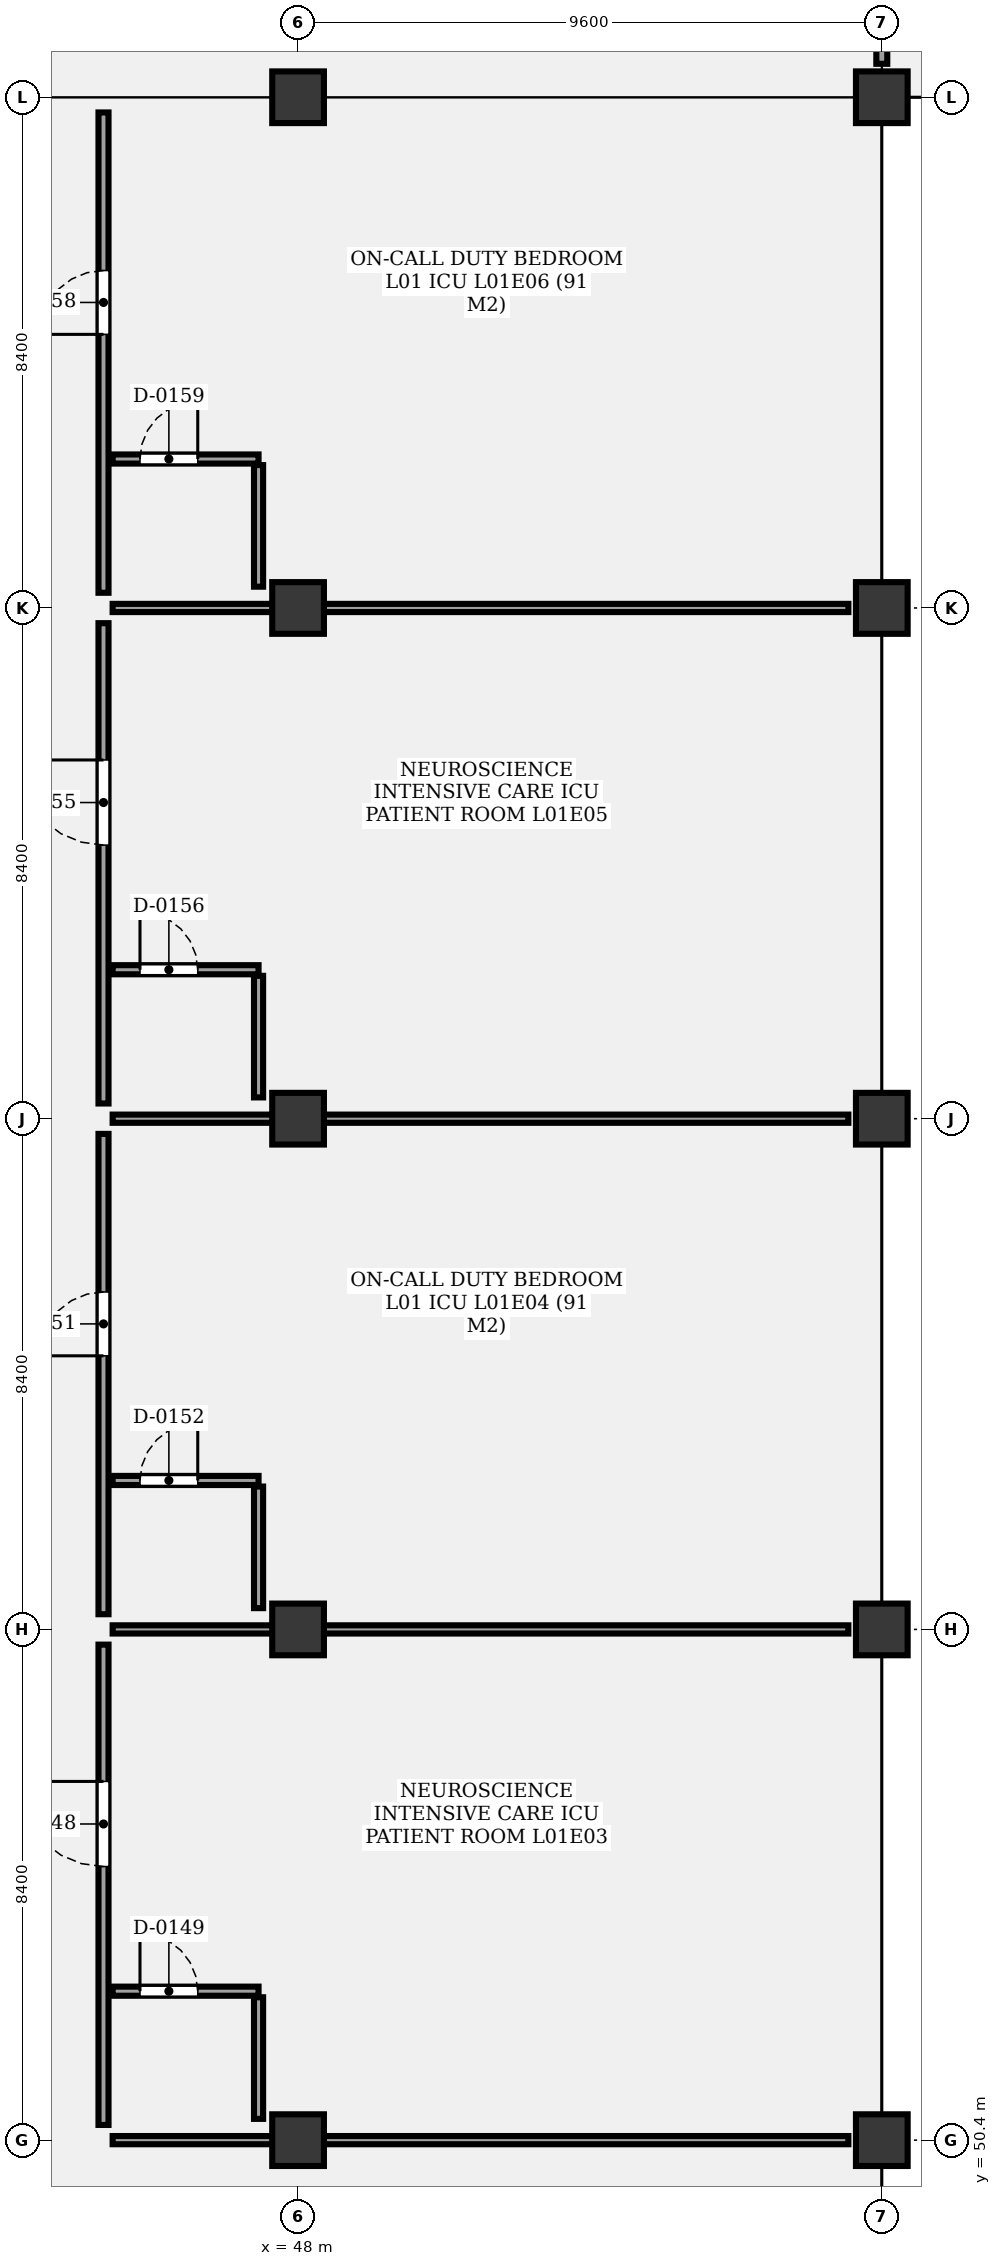
"""IFC4 building model, lengths in metres.
Left out: names, types, materials, properties, quantities, classifications, styles, units other than length and angle.
Written with IfcOpenShell. Run it as: python <this file> out.ifc"""

import sys

from ifc_helpers import new_model, si_unit, direction, frame, frame_2d, origin, origin_2d, place, context, subcontext, project, spatial, rectangle, extrude, element, fill, save


model = new_model("IFC4")
c1 = context("Model", 3, precision=1e-05, world=origin(), true_north=direction((0.0, 1.0)))
c2 = subcontext(c1, "Body", "Model", "MODEL_VIEW")
j1 = project(units=[si_unit("LENGTHUNIT", "METRE"), si_unit("PLANEANGLEUNIT", "RADIAN")], contexts=[c1])
p1 = place(None, origin())
s1 = spatial("IfcSite", under=j1, at=p1, CompositionType="ELEMENT")
p2 = place(p1, origin())
s2 = spatial("IfcBuilding", under=s1, at=p2, CompositionType="ELEMENT")
p3 = place(p2, frame((0.0, 0.0, 5.1)))
s3 = spatial("IfcBuildingStorey", under=s2, at=p3, CompositionType="ELEMENT", Elevation=5.1)
for number, where, z_axis, x_axis in (
    (1, (48.0, 50.4, 0.0), (0.0, 0.0, 1.0), (1.0, 0.0, 0.0)),
    (2, (48.0, 58.8, 0.0), (0.0, 0.0, 1.0), (1.0, 0.0, 0.0)),
    (3, (48.0, 67.2, 0.0), (0.0, 0.0, 1.0), (1.0, 0.0, 0.0)),
    (4, (48.0, 75.6, 0.0), (0.0, 0.0, 1.0), (1.0, 0.0, 0.0)),
    (5, (48.0, 84.0, 0.0), (0.0, 0.0, 1.0), (1.0, 0.0, 0.0)),
    (6, (57.6, 50.4, 0.0), (0.0, 0.0, 1.0), (1.0, 0.0, 0.0)),
    (7, (57.6, 58.8, 0.0), (0.0, 0.0, 1.0), (1.0, 0.0, 0.0)),
    (8, (57.6, 67.2, 0.0), (0.0, 0.0, 1.0), (1.0, 0.0, 0.0)),
    (9, (57.6, 75.6, 0.0), (0.0, 0.0, 1.0), (1.0, 0.0, 0.0)),
    (10, (57.6, 84.0, 0.0), (0.0, 0.0, 1.0), (1.0, 0.0, 0.0)),
):
    element("IfcColumn", number, at=place(p3, frame(where, z_axis=z_axis, x_axis=x_axis)), inside=s3, PredefinedType="COLUMN", context=c2, shape_type="SweptSolid", body=[
        extrude(rectangle(XDim=0.85, YDim=0.85, at=origin_2d()), origin(), (0.0, 0.0, 1.0), 4.8),
    ])
p4 = place(p3, frame((57.6, 84.55, 0.0), z_axis=(0.0, 0.0, 1.0), x_axis=(0.0, 1.0, 0.0)))
e11 = element("IfcWall", 11, at=p4, inside=s3, PredefinedType="PARTITIONING", context=c2, shape_type="SweptSolid", body=[
    extrude(rectangle(XDim=17.3, YDim=0.18, at=frame_2d((8.65, 0.0))), origin(), (0.0, 0.0, 1.0), 3.68),
])
p5 = place(p3, frame((44.8, 50.65, 0.0), z_axis=(0.0, 0.0, 1.0), x_axis=(0.0, 1.0, 0.0)))
e12 = element("IfcWall", 12, at=p5, inside=s3, PredefinedType="PARTITIONING", context=c2, shape_type="SweptSolid", body=[
    extrude(rectangle(XDim=7.9, YDim=0.165, at=frame_2d((3.95, 0.0))), origin(), (0.0, 0.0, 1.0), 3.68),
])
p6 = place(p5, frame((4.25, 0.0, 0.0)))
e13 = element("IfcOpeningElement", 13, at=p6, cuts=e12, PredefinedType="OPENING", context=c2, shape_type="SweptSolid", body=[
    extrude(rectangle(XDim=1.4, YDim=2.4, at=frame_2d((0.7, 1.2))), frame((0.0, 0.093, 0.0), z_axis=(0.0, -1.0, 0.0), x_axis=(1.0, 0.0, 0.0)), (0.0, 0.0, 1.0), 0.185),
])
p7 = place(p3, frame((44.95, 52.85, 0.0), z_axis=(0.0, 0.0, 1.0), x_axis=(1.0, 0.0, 0.0)))
e14 = element("IfcWall", 14, at=p7, inside=s3, PredefinedType="PARTITIONING", context=c2, shape_type="SweptSolid", body=[
    extrude(rectangle(XDim=2.4, YDim=0.15, at=frame_2d((1.2, 0.0))), origin(), (0.0, 0.0, 1.0), 3.68),
])
p8 = place(p7, frame((0.45, 0.0, 0.0)))
e15 = element("IfcOpeningElement", 15, at=p8, cuts=e14, PredefinedType="OPENING", context=c2, shape_type="SweptSolid", body=[
    extrude(rectangle(XDim=0.95, YDim=2.1, at=frame_2d((0.475, 1.05))), frame((0.0, 0.085, 0.0), z_axis=(0.0, -1.0, 0.0), x_axis=(1.0, 0.0, 0.0)), (0.0, 0.0, 1.0), 0.17),
])
p9 = place(p3, frame((47.35, 50.75, 0.0), z_axis=(0.0, 0.0, 1.0), x_axis=(0.0, 1.0, 0.0)))
e16 = element("IfcWall", 16, at=p9, inside=s3, PredefinedType="PARTITIONING", context=c2, shape_type="SweptSolid", body=[
    extrude(rectangle(XDim=2.0, YDim=0.15, at=frame_2d((1.0, 0.0))), origin(), (0.0, 0.0, 1.0), 3.68),
])
p10 = place(p3, frame((44.95, 50.4, 0.0), z_axis=(0.0, 0.0, 1.0), x_axis=(1.0, 0.0, 0.0)))
e17 = element("IfcWall", 17, at=p10, inside=s3, PredefinedType="PARTITIONING", context=c2, shape_type="SweptSolid", body=[
    extrude(rectangle(XDim=12.1, YDim=0.135, at=frame_2d((6.05, 0.0))), origin(), (0.0, 0.0, 1.0), 3.68),
])
p11 = place(p3, frame((44.8, 59.05, 0.0), z_axis=(0.0, 0.0, 1.0), x_axis=(0.0, 1.0, 0.0)))
e18 = element("IfcWall", 18, at=p11, inside=s3, PredefinedType="PARTITIONING", context=c2, shape_type="SweptSolid", body=[
    extrude(rectangle(XDim=7.9, YDim=0.165, at=frame_2d((3.95, 0.0))), origin(), (0.0, 0.0, 1.0), 3.68),
])
p12 = place(p11, frame((4.25, 0.0, 0.0)))
e19 = element("IfcOpeningElement", 19, at=p12, cuts=e18, PredefinedType="OPENING", context=c2, shape_type="SweptSolid", body=[
    extrude(rectangle(XDim=1.05, YDim=2.2, at=frame_2d((0.525, 1.1))), frame((0.0, 0.093, 0.0), z_axis=(0.0, -1.0, 0.0), x_axis=(1.0, 0.0, 0.0)), (0.0, 0.0, 1.0), 0.185),
])
p13 = place(p3, frame((44.95, 61.25, 0.0), z_axis=(0.0, 0.0, 1.0), x_axis=(1.0, 0.0, 0.0)))
e20 = element("IfcWall", 20, at=p13, inside=s3, PredefinedType="PARTITIONING", context=c2, shape_type="SweptSolid", body=[
    extrude(rectangle(XDim=2.4, YDim=0.15, at=frame_2d((1.2, 0.0))), origin(), (0.0, 0.0, 1.0), 3.68),
])
p14 = place(p13, frame((0.45, 0.0, 0.0)))
e21 = element("IfcOpeningElement", 21, at=p14, cuts=e20, PredefinedType="OPENING", context=c2, shape_type="SweptSolid", body=[
    extrude(rectangle(XDim=0.95, YDim=2.1, at=frame_2d((0.475, 1.05))), frame((0.0, 0.085, 0.0), z_axis=(0.0, -1.0, 0.0), x_axis=(1.0, 0.0, 0.0)), (0.0, 0.0, 1.0), 0.17),
])
p15 = place(p3, frame((47.35, 59.15, 0.0), z_axis=(0.0, 0.0, 1.0), x_axis=(0.0, 1.0, 0.0)))
e22 = element("IfcWall", 22, at=p15, inside=s3, PredefinedType="PARTITIONING", context=c2, shape_type="SweptSolid", body=[
    extrude(rectangle(XDim=2.0, YDim=0.15, at=frame_2d((1.0, 0.0))), origin(), (0.0, 0.0, 1.0), 3.68),
])
p16 = place(p3, frame((44.95, 58.8, 0.0), z_axis=(0.0, 0.0, 1.0), x_axis=(1.0, 0.0, 0.0)))
e23 = element("IfcWall", 23, at=p16, inside=s3, PredefinedType="PARTITIONING", context=c2, shape_type="SweptSolid", body=[
    extrude(rectangle(XDim=12.1, YDim=0.135, at=frame_2d((6.05, 0.0))), origin(), (0.0, 0.0, 1.0), 3.68),
])
p17 = place(p3, frame((44.8, 67.45, 0.0), z_axis=(0.0, 0.0, 1.0), x_axis=(0.0, 1.0, 0.0)))
e24 = element("IfcWall", 24, at=p17, inside=s3, PredefinedType="PARTITIONING", context=c2, shape_type="SweptSolid", body=[
    extrude(rectangle(XDim=7.9, YDim=0.165, at=frame_2d((3.95, 0.0))), origin(), (0.0, 0.0, 1.0), 3.68),
])
p18 = place(p17, frame((4.25, 0.0, 0.0)))
e25 = element("IfcOpeningElement", 25, at=p18, cuts=e24, PredefinedType="OPENING", context=c2, shape_type="SweptSolid", body=[
    extrude(rectangle(XDim=1.4, YDim=2.4, at=frame_2d((0.7, 1.2))), frame((0.0, 0.093, 0.0), z_axis=(0.0, -1.0, 0.0), x_axis=(1.0, 0.0, 0.0)), (0.0, 0.0, 1.0), 0.185),
])
p19 = place(p3, frame((44.95, 69.65, 0.0), z_axis=(0.0, 0.0, 1.0), x_axis=(1.0, 0.0, 0.0)))
e26 = element("IfcWall", 26, at=p19, inside=s3, PredefinedType="PARTITIONING", context=c2, shape_type="SweptSolid", body=[
    extrude(rectangle(XDim=2.4, YDim=0.15, at=frame_2d((1.2, 0.0))), origin(), (0.0, 0.0, 1.0), 3.68),
])
p20 = place(p19, frame((0.45, 0.0, 0.0)))
e27 = element("IfcOpeningElement", 27, at=p20, cuts=e26, PredefinedType="OPENING", context=c2, shape_type="SweptSolid", body=[
    extrude(rectangle(XDim=0.95, YDim=2.1, at=frame_2d((0.475, 1.05))), frame((0.0, 0.085, 0.0), z_axis=(0.0, -1.0, 0.0), x_axis=(1.0, 0.0, 0.0)), (0.0, 0.0, 1.0), 0.17),
])
p21 = place(p3, frame((47.35, 67.55, 0.0), z_axis=(0.0, 0.0, 1.0), x_axis=(0.0, 1.0, 0.0)))
e28 = element("IfcWall", 28, at=p21, inside=s3, PredefinedType="PARTITIONING", context=c2, shape_type="SweptSolid", body=[
    extrude(rectangle(XDim=2.0, YDim=0.15, at=frame_2d((1.0, 0.0))), origin(), (0.0, 0.0, 1.0), 3.68),
])
p22 = place(p3, frame((44.95, 67.2, 0.0), z_axis=(0.0, 0.0, 1.0), x_axis=(1.0, 0.0, 0.0)))
e29 = element("IfcWall", 29, at=p22, inside=s3, PredefinedType="PARTITIONING", context=c2, shape_type="SweptSolid", body=[
    extrude(rectangle(XDim=12.1, YDim=0.135, at=frame_2d((6.05, 0.0))), origin(), (0.0, 0.0, 1.0), 3.68),
])
p23 = place(p3, frame((44.8, 75.85, 0.0), z_axis=(0.0, 0.0, 1.0), x_axis=(0.0, 1.0, 0.0)))
e30 = element("IfcWall", 30, at=p23, inside=s3, PredefinedType="PARTITIONING", context=c2, shape_type="SweptSolid", body=[
    extrude(rectangle(XDim=7.9, YDim=0.165, at=frame_2d((3.95, 0.0))), origin(), (0.0, 0.0, 1.0), 3.68),
])
p24 = place(p23, frame((4.25, 0.0, 0.0)))
e31 = element("IfcOpeningElement", 31, at=p24, cuts=e30, PredefinedType="OPENING", context=c2, shape_type="SweptSolid", body=[
    extrude(rectangle(XDim=1.05, YDim=2.2, at=frame_2d((0.525, 1.1))), frame((0.0, 0.093, 0.0), z_axis=(0.0, -1.0, 0.0), x_axis=(1.0, 0.0, 0.0)), (0.0, 0.0, 1.0), 0.185),
])
p25 = place(p3, frame((44.95, 78.05, 0.0), z_axis=(0.0, 0.0, 1.0), x_axis=(1.0, 0.0, 0.0)))
e32 = element("IfcWall", 32, at=p25, inside=s3, PredefinedType="PARTITIONING", context=c2, shape_type="SweptSolid", body=[
    extrude(rectangle(XDim=2.4, YDim=0.15, at=frame_2d((1.2, 0.0))), origin(), (0.0, 0.0, 1.0), 3.68),
])
p26 = place(p25, frame((0.45, 0.0, 0.0)))
e33 = element("IfcOpeningElement", 33, at=p26, cuts=e32, PredefinedType="OPENING", context=c2, shape_type="SweptSolid", body=[
    extrude(rectangle(XDim=0.95, YDim=2.1, at=frame_2d((0.475, 1.05))), frame((0.0, 0.085, 0.0), z_axis=(0.0, -1.0, 0.0), x_axis=(1.0, 0.0, 0.0)), (0.0, 0.0, 1.0), 0.17),
])
p27 = place(p3, frame((47.35, 75.95, 0.0), z_axis=(0.0, 0.0, 1.0), x_axis=(0.0, 1.0, 0.0)))
e34 = element("IfcWall", 34, at=p27, inside=s3, PredefinedType="PARTITIONING", context=c2, shape_type="SweptSolid", body=[
    extrude(rectangle(XDim=2.0, YDim=0.15, at=frame_2d((1.0, 0.0))), origin(), (0.0, 0.0, 1.0), 3.68),
])
p28 = place(p3, frame((44.95, 75.6, 0.0), z_axis=(0.0, 0.0, 1.0), x_axis=(1.0, 0.0, 0.0)))
e35 = element("IfcWall", 35, at=p28, inside=s3, PredefinedType="PARTITIONING", context=c2, shape_type="SweptSolid", body=[
    extrude(rectangle(XDim=12.1, YDim=0.135, at=frame_2d((6.05, 0.0))), origin(), (0.0, 0.0, 1.0), 3.68),
])
p29 = place(p6, origin())
e36 = element("IfcDoor", 36, at=p29, inside=s3, OperationType="SINGLE_SWING_RIGHT", PredefinedType="DOOR", context=c2, shape_type="SweptSolid", body=[
    extrude(rectangle(XDim=1.4, YDim=2.4, at=frame_2d((0.7, 1.2))), frame((0.0, 0.025, 0.0), z_axis=(0.0, -1.0, 0.0), x_axis=(1.0, 0.0, 0.0)), (0.0, 0.0, 1.0), 0.05),
])
fill(e13, e36)
p30 = place(p8, origin())
e37 = element("IfcDoor", 37, at=p30, inside=s3, OperationType="SINGLE_SWING_LEFT", PredefinedType="DOOR", context=c2, shape_type="SweptSolid", body=[
    extrude(rectangle(XDim=0.95, YDim=2.1, at=frame_2d((0.475, 1.05))), frame((0.0, 0.025, 0.0), z_axis=(0.0, -1.0, 0.0), x_axis=(1.0, 0.0, 0.0)), (0.0, 0.0, 1.0), 0.05),
])
fill(e15, e37)
p31 = place(p12, origin())
e38 = element("IfcDoor", 38, at=p31, inside=s3, OperationType="SINGLE_SWING_LEFT", PredefinedType="DOOR", context=c2, shape_type="SweptSolid", body=[
    extrude(rectangle(XDim=1.05, YDim=2.2, at=frame_2d((0.525, 1.1))), frame((0.0, 0.025, 0.0), z_axis=(0.0, -1.0, 0.0), x_axis=(1.0, 0.0, 0.0)), (0.0, 0.0, 1.0), 0.05),
])
fill(e19, e38)
p32 = place(p14, origin())
e39 = element("IfcDoor", 39, at=p32, inside=s3, OperationType="SINGLE_SWING_RIGHT", PredefinedType="DOOR", context=c2, shape_type="SweptSolid", body=[
    extrude(rectangle(XDim=0.95, YDim=2.1, at=frame_2d((0.475, 1.05))), frame((0.0, 0.025, 0.0), z_axis=(0.0, -1.0, 0.0), x_axis=(1.0, 0.0, 0.0)), (0.0, 0.0, 1.0), 0.05),
])
fill(e21, e39)
p33 = place(p18, origin())
e40 = element("IfcDoor", 40, at=p33, inside=s3, OperationType="SINGLE_SWING_RIGHT", PredefinedType="DOOR", context=c2, shape_type="SweptSolid", body=[
    extrude(rectangle(XDim=1.4, YDim=2.4, at=frame_2d((0.7, 1.2))), frame((0.0, 0.025, 0.0), z_axis=(0.0, -1.0, 0.0), x_axis=(1.0, 0.0, 0.0)), (0.0, 0.0, 1.0), 0.05),
])
fill(e25, e40)
p34 = place(p20, origin())
e41 = element("IfcDoor", 41, at=p34, inside=s3, OperationType="SINGLE_SWING_LEFT", PredefinedType="DOOR", context=c2, shape_type="SweptSolid", body=[
    extrude(rectangle(XDim=0.95, YDim=2.1, at=frame_2d((0.475, 1.05))), frame((0.0, 0.025, 0.0), z_axis=(0.0, -1.0, 0.0), x_axis=(1.0, 0.0, 0.0)), (0.0, 0.0, 1.0), 0.05),
])
fill(e27, e41)
p35 = place(p24, origin())
e42 = element("IfcDoor", 42, at=p35, inside=s3, OperationType="SINGLE_SWING_LEFT", PredefinedType="DOOR", context=c2, shape_type="SweptSolid", body=[
    extrude(rectangle(XDim=1.05, YDim=2.2, at=frame_2d((0.525, 1.1))), frame((0.0, 0.025, 0.0), z_axis=(0.0, -1.0, 0.0), x_axis=(1.0, 0.0, 0.0)), (0.0, 0.0, 1.0), 0.05),
])
fill(e31, e42)
p36 = place(p26, origin())
e43 = element("IfcDoor", 43, at=p36, inside=s3, OperationType="SINGLE_SWING_RIGHT", PredefinedType="DOOR", context=c2, shape_type="SweptSolid", body=[
    extrude(rectangle(XDim=0.95, YDim=2.1, at=frame_2d((0.475, 1.05))), frame((0.0, 0.025, 0.0), z_axis=(0.0, -1.0, 0.0), x_axis=(1.0, 0.0, 0.0)), (0.0, 0.0, 1.0), 0.05),
])
fill(e33, e43)
save(model, sys.argv[1])
